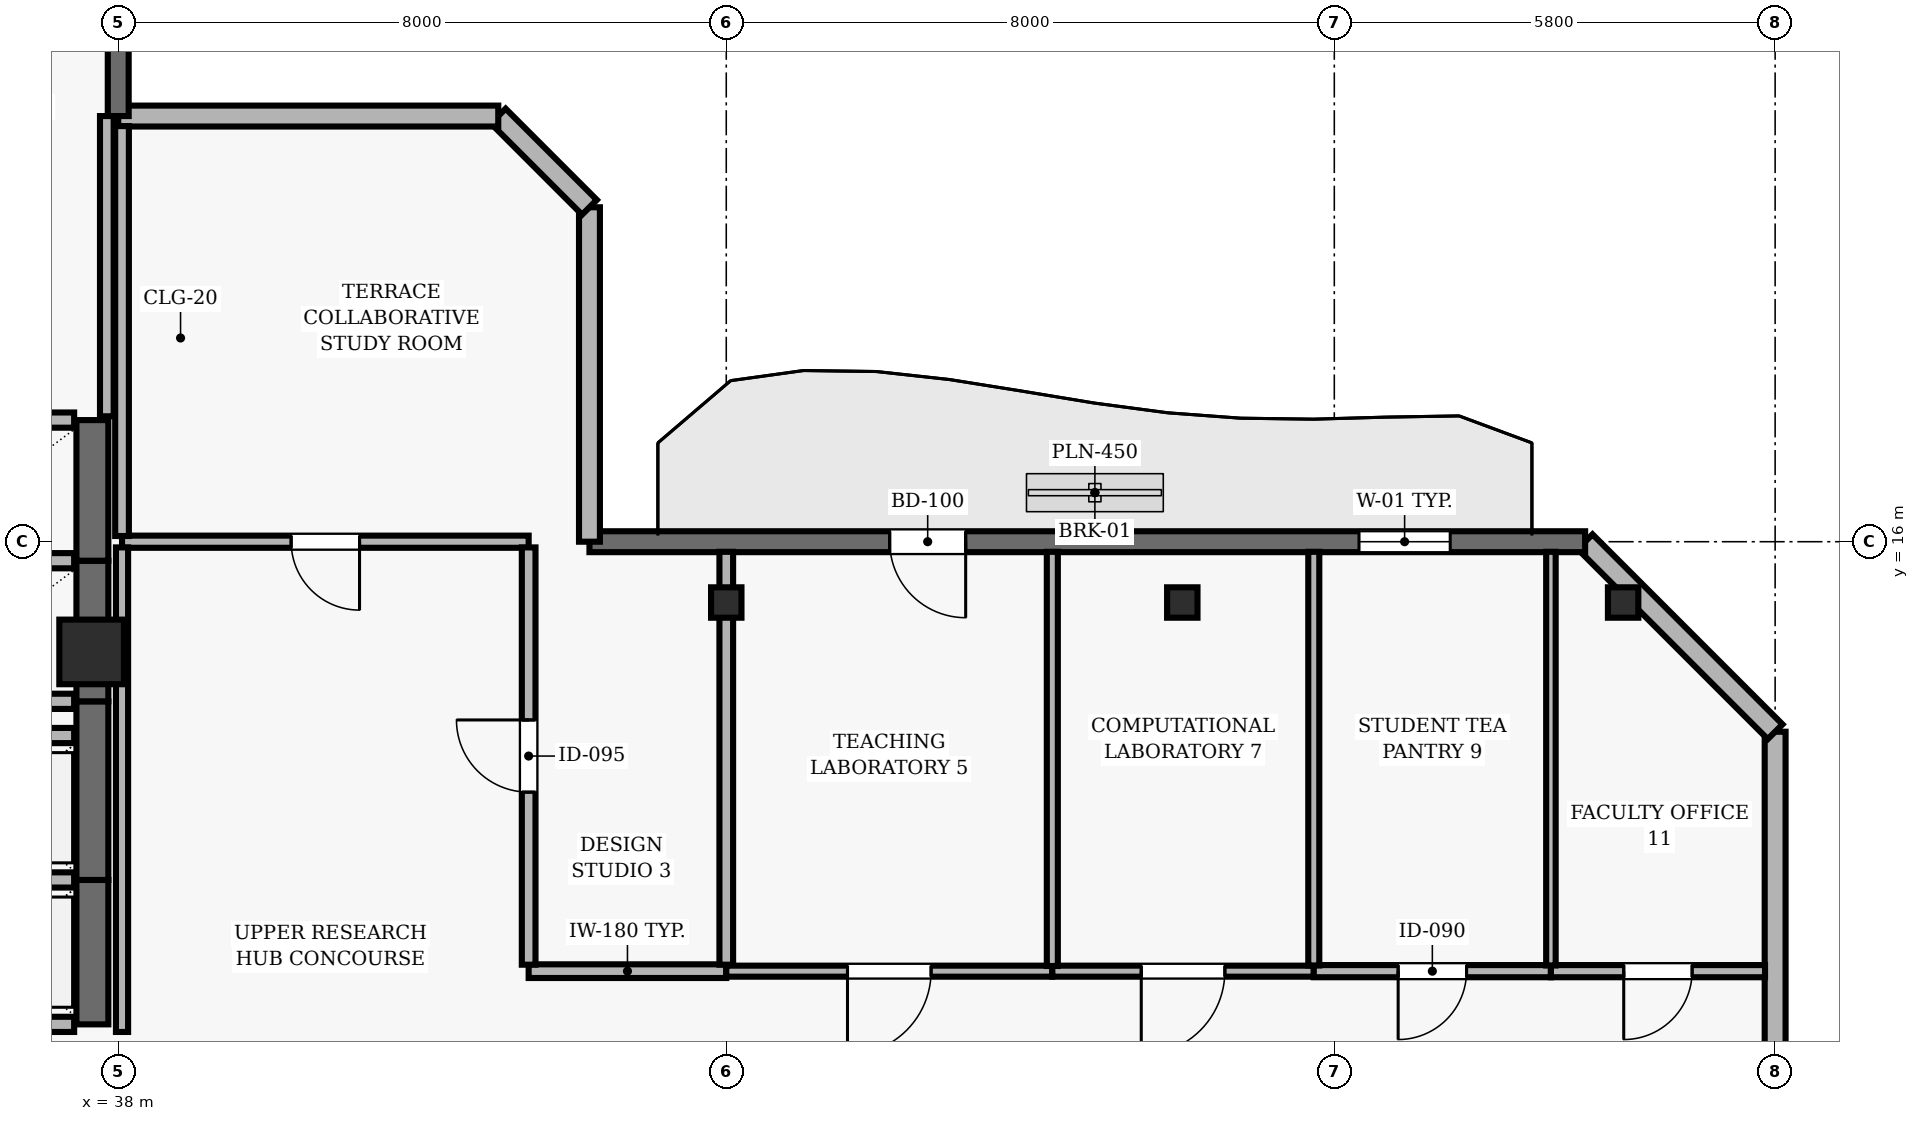
"""IFC4 building model, lengths in metres.
Left out: names, types, materials, properties, quantities, classifications, styles, units other than length and angle.
Written with IfcOpenShell. Run it as: python <this file> out.ifc"""

import sys

from ifc_helpers import new_model, si_unit, direction, frame, frame_2d, origin, origin_2d, place, context, subcontext, project, spatial, rectangle, hollow_rectangle, extrude, element, fill, save


model = new_model("IFC4")
c1 = context("Model", 3, precision=1e-05, world=origin(), true_north=direction((0.0, 1.0)))
c2 = subcontext(c1, "Body", "Model", "MODEL_VIEW")
j1 = project(units=[si_unit("LENGTHUNIT", "METRE"), si_unit("PLANEANGLEUNIT", "RADIAN")], contexts=[c1])
p1 = place(None, origin())
s1 = spatial("IfcSite", under=j1, at=p1, CompositionType="ELEMENT")
p2 = place(p1, origin())
s2 = spatial("IfcBuilding", under=s1, at=p2, CompositionType="ELEMENT")
p3 = place(p2, frame((0.0, 0.0, 279.4)))
s3 = spatial("IfcBuildingStorey", under=s2, at=p3, CompositionType="ELEMENT", Elevation=279.4)
p4 = place(p3, frame((37.65, 14.55, 0.0), z_axis=(0.0, 0.0, 1.0), x_axis=(1.0, 0.0, 0.0)))
e1 = element("IfcColumn", 1, at=p4, inside=s3, PredefinedType="COLUMN", context=c2, shape_type="SweptSolid", body=[
    extrude(rectangle(XDim=0.85, YDim=0.85, at=origin_2d()), origin(), (0.0, 0.0, 1.0), 3.9),
])
for number, where, z_axis, x_axis in (
    (2, (46.0, 15.2, 0.0), (0.0, 0.0, 1.0), (1.0, 0.0, 0.0)),
    (3, (52.0, 15.2, 0.0), (0.0, 0.0, 1.0), (1.0, 0.0, 0.0)),
    (4, (57.8, 15.2, 0.0), (0.0, 0.0, 1.0), (1.0, 0.0, 0.0)),
):
    element("IfcColumn", number, at=place(p3, frame(where, z_axis=z_axis, x_axis=x_axis)), inside=s3, PredefinedType="COLUMN", context=c2, shape_type="SweptSolid", body=[
        extrude(hollow_rectangle(XDim=0.4, YDim=0.4, WallThickness=0.02, at=origin_2d()), origin(), (0.0, 0.0, 1.0), 3.9),
    ])
p5 = place(p3, frame((59.8, 2.5, 0.0), z_axis=(0.0, 0.0, 1.0), x_axis=(0.0, 1.0, 0.0)))
e5 = element("IfcWall", 5, at=p5, inside=s3, PredefinedType="SOLIDWALL", context=c2, shape_type="SweptSolid", body=[
    extrude(rectangle(XDim=11.0, YDim=0.275, at=frame_2d((5.5, 0.0))), origin(), (0.0, 0.0, 1.0), 3.69),
])
p6 = place(p5, frame((1.55, 0.0, 0.9)))
e6 = element("IfcOpeningElement", 6, at=p6, cuts=e5, PredefinedType="OPENING", context=c2, shape_type="SweptSolid", body=[
    extrude(rectangle(XDim=2.4, YDim=2.2, at=frame_2d((1.2, 1.1))), frame((0.0, 0.147, 0.0), z_axis=(0.0, -1.0, 0.0), x_axis=(1.0, 0.0, 0.0)), (0.0, 0.0, 1.0), 0.295),
])
p7 = place(p3, frame((59.8, 13.5, 0.0), z_axis=(0.0, 0.0, 1.0), x_axis=(-0.707106781187, 0.707106781187, 0.0)))
e7 = element("IfcWall", 7, at=p7, inside=s3, PredefinedType="SOLIDWALL", context=c2, shape_type="SweptSolid", body=[
    extrude(rectangle(XDim=3.536, YDim=0.275, at=frame_2d((1.768, 0.0))), origin(), (0.0, 0.0, 1.0), 3.69),
])
p8 = place(p3, frame((57.3, 16.0, 0.0), z_axis=(0.0, 0.0, 1.0), x_axis=(-1.0, 0.0, 0.0)))
e8 = element("IfcWall", 8, at=p8, inside=s3, PredefinedType="SOLIDWALL", context=c2, shape_type="SweptSolid", body=[
    extrude(rectangle(XDim=13.1, YDim=0.275, at=frame_2d((6.55, 0.0))), origin(), (0.0, 0.0, 1.0), 3.69),
])
p9 = place(p8, frame((8.15, 0.0, 0.0)))
e9 = element("IfcOpeningElement", 9, at=p9, cuts=e8, PredefinedType="OPENING", context=c2, shape_type="SweptSolid", body=[
    extrude(rectangle(XDim=1.0, YDim=2.2, at=frame_2d((0.5, 1.1))), frame((0.0, 0.147, 0.0), z_axis=(0.0, -1.0, 0.0), x_axis=(1.0, 0.0, 0.0)), (0.0, 0.0, 1.0), 0.295),
])
p10 = place(p8, frame((1.775, 0.0, 0.9)))
e10 = element("IfcOpeningElement", 10, at=p10, cuts=e8, PredefinedType="OPENING", context=c2, shape_type="SweptSolid", body=[
    extrude(rectangle(XDim=1.2, YDim=1.6, at=frame_2d((0.6, 0.8))), frame((0.0, 0.147, 0.0), z_axis=(0.0, -1.0, 0.0), x_axis=(1.0, 0.0, 0.0)), (0.0, 0.0, 1.0), 0.295),
])
p11 = place(p3, frame((44.2, 16.0, 0.0), z_axis=(0.0, 0.0, 1.0), x_axis=(0.0, 1.0, 0.0)))
e11 = element("IfcWall", 11, at=p11, inside=s3, PredefinedType="SOLIDWALL", context=c2, shape_type="SweptSolid", body=[
    extrude(rectangle(XDim=4.4, YDim=0.275, at=frame_2d((2.2, 0.0))), origin(), (0.0, 0.0, 1.0), 3.69),
])
p12 = place(p3, frame((44.2, 20.4, 0.0), z_axis=(0.0, 0.0, 1.0), x_axis=(-0.707034851297, 0.707178703759, 0.0)))
e12 = element("IfcWall", 12, at=p12, inside=s3, PredefinedType="SOLIDWALL", context=c2, shape_type="SweptSolid", body=[
    extrude(rectangle(XDim=1.697, YDim=0.275, at=frame_2d((0.849, 0.0))), origin(), (0.0, 0.0, 1.0), 3.69),
])
p13 = place(p3, frame((43.0, 21.6, 0.0), z_axis=(0.0, 0.0, 1.0), x_axis=(-1.0, 0.0, 0.0)))
e13 = element("IfcWall", 13, at=p13, inside=s3, PredefinedType="SOLIDWALL", context=c2, shape_type="SweptSolid", body=[
    extrude(rectangle(XDim=5.0, YDim=0.275, at=frame_2d((2.5, 0.0))), origin(), (0.0, 0.0, 1.0), 3.69),
])
p14 = place(p3, frame((38.0, 21.6, 0.0), z_axis=(0.0, 0.0, 1.0), x_axis=(0.0, 1.0, 0.0)))
e14 = element("IfcWall", 14, at=p14, inside=s3, PredefinedType="SOLIDWALL", context=c2, shape_type="SweptSolid", body=[
    extrude(rectangle(XDim=13.7, YDim=0.275, at=frame_2d((6.85, 0.0))), origin(), (0.0, 0.0, 1.0), 3.69),
])
p15 = place(p14, frame((5.85, 0.0, 0.0)))
e15 = element("IfcOpeningElement", 15, at=p15, cuts=e14, PredefinedType="OPENING", context=c2, shape_type="SweptSolid", body=[
    extrude(rectangle(XDim=1.0, YDim=2.2, at=frame_2d((0.5, 1.1))), frame((0.0, 0.147, 0.0), z_axis=(0.0, -1.0, 0.0), x_axis=(1.0, 0.0, 0.0)), (0.0, 0.0, 1.0), 0.295),
])
p16 = place(p14, frame((9.075, 0.0, 0.9)))
e16 = element("IfcOpeningElement", 16, at=p16, cuts=e14, PredefinedType="OPENING", context=c2, shape_type="SweptSolid", body=[
    extrude(rectangle(XDim=2.4, YDim=1.6, at=frame_2d((1.2, 0.8))), frame((0.0, 0.147, 0.0), z_axis=(0.0, -1.0, 0.0), x_axis=(1.0, 0.0, 0.0)), (0.0, 0.0, 1.0), 0.295),
])
p17 = place(p3, frame((37.66, 9.65, 0.0), z_axis=(0.0, 0.0, 1.0), x_axis=(0.0, 1.0, 0.0)))
e17 = element("IfcWall", 17, at=p17, inside=s3, PredefinedType="SHEAR", context=c2, shape_type="SweptSolid", body=[
    extrude(rectangle(XDim=1.9, YDim=0.42, at=frame_2d((0.95, 0.0))), origin(), (0.0, 0.0, 1.0), 3.69),
])
for number, where, z_axis, x_axis in (
    (18, (35.28, 9.65, 0.0), (0.0, 0.0, 1.0), (1.0, 0.0, 0.0)),
    (19, (37.42, 11.55, 0.0), (0.0, 0.0, 1.0), (-1.0, 0.0, 0.0)),
):
    element("IfcWall", number, at=place(p3, frame(where, z_axis=z_axis, x_axis=x_axis)), inside=s3, PredefinedType="SOLIDWALL", context=c2, shape_type="SweptSolid", body=[
        extrude(rectangle(XDim=2.14, YDim=0.2, at=frame_2d((1.07, 0.0))), origin(), (0.0, 0.0, 1.0), 3.69),
    ])
p18 = place(p3, frame((37.66, 11.55, 0.0), z_axis=(0.0, 0.0, 1.0), x_axis=(0.0, 1.0, 0.0)))
e20 = element("IfcWall", 20, at=p18, inside=s3, PredefinedType="SHEAR", context=c2, shape_type="SweptSolid", body=[
    extrude(rectangle(XDim=2.35, YDim=0.42, at=frame_2d((1.175, 0.0))), origin(), (0.0, 0.0, 1.0), 3.69),
])
p19 = place(p3, frame((37.42, 13.45, 0.0), z_axis=(0.0, 0.0, 1.0), x_axis=(-1.0, 0.0, 0.0)))
e21 = element("IfcWall", 21, at=p19, inside=s3, PredefinedType="SOLIDWALL", context=c2, shape_type="SweptSolid", body=[
    extrude(rectangle(XDim=2.14, YDim=0.2, at=frame_2d((1.07, 0.0))), origin(), (0.0, 0.0, 1.0), 3.69),
])
p20 = place(p3, frame((37.66, 13.9, 0.0), z_axis=(0.0, 0.0, 1.0), x_axis=(0.0, 1.0, 0.0)))
e22 = element("IfcWall", 22, at=p20, inside=s3, PredefinedType="SHEAR", context=c2, shape_type="SweptSolid", body=[
    extrude(rectangle(XDim=1.85, YDim=0.42, at=frame_2d((0.925, 0.0))), origin(), (0.0, 0.0, 1.0), 3.69),
])
for number, where, z_axis, x_axis in (
    (23, (35.28, 13.9, 0.0), (0.0, 0.0, 1.0), (1.0, 0.0, 0.0)),
    (24, (37.42, 15.75, 0.0), (0.0, 0.0, 1.0), (-1.0, 0.0, 0.0)),
):
    element("IfcWall", number, at=place(p3, frame(where, z_axis=z_axis, x_axis=x_axis)), inside=s3, PredefinedType="SOLIDWALL", context=c2, shape_type="SweptSolid", body=[
        extrude(rectangle(XDim=2.14, YDim=0.2, at=frame_2d((1.07, 0.0))), origin(), (0.0, 0.0, 1.0), 3.69),
    ])
p21 = place(p3, frame((37.66, 15.75, 0.0), z_axis=(0.0, 0.0, 1.0), x_axis=(0.0, 1.0, 0.0)))
e25 = element("IfcWall", 25, at=p21, inside=s3, PredefinedType="SHEAR", context=c2, shape_type="SweptSolid", body=[
    extrude(rectangle(XDim=1.85, YDim=0.42, at=frame_2d((0.925, 0.0))), origin(), (0.0, 0.0, 1.0), 3.69),
])
p22 = place(p3, frame((37.42, 17.6, 0.0), z_axis=(0.0, 0.0, 1.0), x_axis=(-1.0, 0.0, 0.0)))
e26 = element("IfcWall", 26, at=p22, inside=s3, PredefinedType="SOLIDWALL", context=c2, shape_type="SweptSolid", body=[
    extrude(rectangle(XDim=2.14, YDim=0.2, at=frame_2d((1.07, 0.0))), origin(), (0.0, 0.0, 1.0), 3.69),
])
p23 = place(p3, frame((43.4, 16.0, 0.0), z_axis=(0.0, 0.0, 1.0), x_axis=(-1.0, 0.0, 0.0)))
e27 = element("IfcWall", 27, at=p23, inside=s3, PredefinedType="PARTITIONING", context=c2, shape_type="SweptSolid", body=[
    extrude(rectangle(XDim=5.35, YDim=0.16, at=frame_2d((2.675, 0.0))), origin(), (0.0, 0.0, 1.0), 3.39),
])
p24 = place(p23, frame((2.225, 0.0, 0.0)))
e28 = element("IfcOpeningElement", 28, at=p24, cuts=e27, PredefinedType="OPENING", context=c2, shape_type="SweptSolid", body=[
    extrude(rectangle(XDim=0.9, YDim=2.1, at=frame_2d((0.45, 1.05))), frame((0.0, 0.09, 0.0), z_axis=(0.0, -1.0, 0.0), x_axis=(1.0, 0.0, 0.0)), (0.0, 0.0, 1.0), 0.18),
])
p25 = place(p3, frame((46.0, 10.35, 0.0), z_axis=(0.0, 0.0, 1.0), x_axis=(-1.0, 0.0, 0.0)))
e29 = element("IfcWall", 29, at=p25, inside=s3, PredefinedType="PARTITIONING", context=c2, shape_type="SweptSolid", body=[
    extrude(rectangle(XDim=2.6, YDim=0.18, at=frame_2d((1.3, 0.0))), origin(), (0.0, 0.0, 1.0), 3.372),
])
p26 = place(p3, frame((50.29, 10.35, 0.0), z_axis=(0.0, 0.0, 1.0), x_axis=(-1.0, 0.0, 0.0)))
e30 = element("IfcWall", 30, at=p26, inside=s3, PredefinedType="PARTITIONING", context=c2, shape_type="SweptSolid", body=[
    extrude(rectangle(XDim=4.29, YDim=0.145, at=frame_2d((2.145, 0.0))), origin(), (0.0, 0.0, 1.0), 3.372),
])
p27 = place(p26, frame((1.595, 0.0, 0.0)))
e31 = element("IfcOpeningElement", 31, at=p27, cuts=e30, PredefinedType="OPENING", context=c2, shape_type="SweptSolid", body=[
    extrude(rectangle(XDim=1.1, YDim=2.15, at=frame_2d((0.55, 1.075))), frame((0.0, 0.083, 0.0), z_axis=(0.0, -1.0, 0.0), x_axis=(1.0, 0.0, 0.0)), (0.0, 0.0, 1.0), 0.165),
])
p28 = place(p3, frame((53.73, 10.35, 0.0), z_axis=(0.0, 0.0, 1.0), x_axis=(-1.0, 0.0, 0.0)))
e32 = element("IfcWall", 32, at=p28, inside=s3, PredefinedType="PARTITIONING", context=c2, shape_type="SweptSolid", body=[
    extrude(rectangle(XDim=3.44, YDim=0.145, at=frame_2d((1.72, 0.0))), origin(), (0.0, 0.0, 1.0), 3.372),
])
p29 = place(p28, frame((1.17, 0.0, 0.0)))
e33 = element("IfcOpeningElement", 33, at=p29, cuts=e32, PredefinedType="OPENING", context=c2, shape_type="SweptSolid", body=[
    extrude(rectangle(XDim=1.1, YDim=2.15, at=frame_2d((0.55, 1.075))), frame((0.0, 0.083, 0.0), z_axis=(0.0, -1.0, 0.0), x_axis=(1.0, 0.0, 0.0)), (0.0, 0.0, 1.0), 0.165),
])
p30 = place(p3, frame((56.85, 10.35, 0.0), z_axis=(0.0, 0.0, 1.0), x_axis=(-1.0, 0.0, 0.0)))
e34 = element("IfcWall", 34, at=p30, inside=s3, PredefinedType="PARTITIONING", context=c2, shape_type="SweptSolid", body=[
    extrude(rectangle(XDim=3.12, YDim=0.16, at=frame_2d((1.56, 0.0))), origin(), (0.0, 0.0, 1.0), 3.372),
])
p31 = place(p30, frame((1.11, 0.0, 0.0)))
e35 = element("IfcOpeningElement", 35, at=p31, cuts=e34, PredefinedType="OPENING", context=c2, shape_type="SweptSolid", body=[
    extrude(rectangle(XDim=0.9, YDim=2.1, at=frame_2d((0.45, 1.05))), frame((0.0, 0.09, 0.0), z_axis=(0.0, -1.0, 0.0), x_axis=(1.0, 0.0, 0.0)), (0.0, 0.0, 1.0), 0.18),
])
p32 = place(p3, frame((59.667, 10.35, 0.0), z_axis=(0.0, 0.0, 1.0), x_axis=(-1.0, 0.0, 0.0)))
e36 = element("IfcWall", 36, at=p32, inside=s3, PredefinedType="PARTITIONING", context=c2, shape_type="SweptSolid", body=[
    extrude(rectangle(XDim=2.817, YDim=0.16, at=frame_2d((1.408, 0.0))), origin(), (0.0, 0.0, 1.0), 3.372),
])
p33 = place(p32, frame((0.959, 0.0, 0.0)))
e37 = element("IfcOpeningElement", 37, at=p33, cuts=e36, PredefinedType="OPENING", context=c2, shape_type="SweptSolid", body=[
    extrude(rectangle(XDim=0.9, YDim=2.1, at=frame_2d((0.45, 1.05))), frame((0.0, 0.09, 0.0), z_axis=(0.0, -1.0, 0.0), x_axis=(1.0, 0.0, 0.0)), (0.0, 0.0, 1.0), 0.18),
])
p34 = place(p3, frame((37.85, 17.65, 0.0), z_axis=(0.0, 0.0, 1.0), x_axis=(0.0, 1.0, 0.0)))
e38 = element("IfcWall", 38, at=p34, inside=s3, PredefinedType="PARTITIONING", context=c2, shape_type="SweptSolid", body=[
    extrude(rectangle(XDim=3.95, YDim=0.18, at=frame_2d((1.975, 0.0))), origin(), (0.0, 0.0, 1.0), 3.221),
])
p35 = place(p3, frame((38.05, 15.925, 0.0), z_axis=(0.0, 0.0, 1.0), x_axis=(0.0, -1.0, 0.0)))
e39 = element("IfcWall", 39, at=p35, inside=s3, PredefinedType="PARTITIONING", context=c2, shape_type="SweptSolid", body=[
    extrude(rectangle(XDim=6.375, YDim=0.16, at=frame_2d((3.188, 0.0))), origin(), (0.0, 0.0, 1.0), 3.221),
])
p36 = place(p3, frame((38.05, 21.468, 0.0), z_axis=(0.0, 0.0, 1.0), x_axis=(0.0, -1.0, 0.0)))
e40 = element("IfcWall", 40, at=p36, inside=s3, PredefinedType="PARTITIONING", context=c2, shape_type="SweptSolid", body=[
    extrude(rectangle(XDim=5.393, YDim=0.18, at=frame_2d((2.697, 0.0))), origin(), (0.0, 0.0, 1.0), 3.221),
])
p37 = place(p3, frame((43.4, 10.435, 0.0), z_axis=(0.0, 0.0, 1.0), x_axis=(0.0, 1.0, 0.0)))
e41 = element("IfcWall", 41, at=p37, inside=s3, PredefinedType="PARTITIONING", context=c2, shape_type="SweptSolid", body=[
    extrude(rectangle(XDim=5.49, YDim=0.18, at=frame_2d((2.745, 0.0))), origin(), (0.0, 0.0, 1.0), 3.69),
])
p38 = place(p37, frame((2.27, 0.0, 0.0)))
e42 = element("IfcOpeningElement", 42, at=p38, cuts=e41, PredefinedType="OPENING", context=c2, shape_type="SweptSolid", body=[
    extrude(rectangle(XDim=0.95, YDim=2.1, at=frame_2d((0.475, 1.05))), frame((0.0, 0.1, 0.0), z_axis=(0.0, -1.0, 0.0), x_axis=(1.0, 0.0, 0.0)), (0.0, 0.0, 1.0), 0.2),
])
p39 = place(p3, frame((46.0, 10.435, 0.0), z_axis=(0.0, 0.0, 1.0), x_axis=(0.0, 1.0, 0.0)))
e43 = element("IfcWall", 43, at=p39, inside=s3, PredefinedType="PARTITIONING", context=c2, shape_type="SweptSolid", body=[
    extrude(rectangle(XDim=5.432, YDim=0.18, at=frame_2d((2.716, 0.0))), origin(), (0.0, 0.0, 1.0), 3.221),
])
p40 = place(p3, frame((50.29, 10.418, 0.0), z_axis=(0.0, 0.0, 1.0), x_axis=(0.0, 1.0, 0.0)))
e44 = element("IfcWall", 44, at=p40, inside=s3, PredefinedType="PARTITIONING", context=c2, shape_type="SweptSolid", body=[
    extrude(rectangle(XDim=5.449, YDim=0.145, at=frame_2d((2.725, 0.0))), origin(), (0.0, 0.0, 1.0), 3.69),
])
p41 = place(p3, frame((53.73, 10.425, 0.0), z_axis=(0.0, 0.0, 1.0), x_axis=(0.0, 1.0, 0.0)))
e45 = element("IfcWall", 45, at=p41, inside=s3, PredefinedType="PARTITIONING", context=c2, shape_type="SweptSolid", body=[
    extrude(rectangle(XDim=5.442, YDim=0.145, at=frame_2d((2.721, 0.0))), origin(), (0.0, 0.0, 1.0), 3.69),
])
p42 = place(p3, frame((56.85, 10.425, 0.0), z_axis=(0.0, 0.0, 1.0), x_axis=(0.0, 1.0, 0.0)))
e46 = element("IfcWall", 46, at=p42, inside=s3, PredefinedType="PARTITIONING", context=c2, shape_type="SweptSolid", body=[
    extrude(rectangle(XDim=5.442, YDim=0.125, at=frame_2d((2.721, 0.0))), origin(), (0.0, 0.0, 1.0), 3.69),
])
p43 = place(p9, origin())
e47 = element("IfcDoor", 47, at=p43, inside=s3, OperationType="SINGLE_SWING_LEFT", PredefinedType="DOOR", context=c2, shape_type="SweptSolid", body=[
    extrude(rectangle(XDim=1.0, YDim=2.2, at=frame_2d((0.5, 1.1))), frame((0.0, 0.025, 0.0), z_axis=(0.0, -1.0, 0.0), x_axis=(1.0, 0.0, 0.0)), (0.0, 0.0, 1.0), 0.05),
])
fill(e9, e47)
p44 = place(p10, origin())
e48 = element("IfcWindow", 48, at=p44, inside=s3, PartitioningType="SINGLE_PANEL", PredefinedType="WINDOW", context=c2, shape_type="SweptSolid", body=[
    extrude(rectangle(XDim=1.2, YDim=1.6, at=frame_2d((0.6, 0.8))), frame((0.0, 0.03, 0.0), z_axis=(0.0, -1.0, 0.0), x_axis=(1.0, 0.0, 0.0)), (0.0, 0.0, 1.0), 0.06),
])
fill(e10, e48)
p45 = place(p38, origin())
e49 = element("IfcDoor", 49, at=p45, inside=s3, OperationType="SINGLE_SWING_RIGHT", PredefinedType="DOOR", context=c2, shape_type="SweptSolid", body=[
    extrude(rectangle(XDim=0.95, YDim=2.1, at=frame_2d((0.475, 1.05))), frame((0.0, 0.025, 0.0), z_axis=(0.0, -1.0, 0.0), x_axis=(1.0, 0.0, 0.0)), (0.0, 0.0, 1.0), 0.05),
])
fill(e42, e49)
p46 = place(p27, origin())
e50 = element("IfcDoor", 50, at=p46, inside=s3, OperationType="SINGLE_SWING_RIGHT", PredefinedType="DOOR", context=c2, shape_type="SweptSolid", body=[
    extrude(rectangle(XDim=1.1, YDim=2.15, at=frame_2d((0.55, 1.075))), frame((0.0, 0.025, 0.0), z_axis=(0.0, -1.0, 0.0), x_axis=(1.0, 0.0, 0.0)), (0.0, 0.0, 1.0), 0.05),
])
fill(e31, e50)
p47 = place(p29, origin())
e51 = element("IfcDoor", 51, at=p47, inside=s3, OperationType="SINGLE_SWING_RIGHT", PredefinedType="DOOR", context=c2, shape_type="SweptSolid", body=[
    extrude(rectangle(XDim=1.1, YDim=2.15, at=frame_2d((0.55, 1.075))), frame((0.0, 0.025, 0.0), z_axis=(0.0, -1.0, 0.0), x_axis=(1.0, 0.0, 0.0)), (0.0, 0.0, 1.0), 0.05),
])
fill(e33, e51)
p48 = place(p31, origin())
e52 = element("IfcDoor", 52, at=p48, inside=s3, OperationType="SINGLE_SWING_RIGHT", PredefinedType="DOOR", context=c2, shape_type="SweptSolid", body=[
    extrude(rectangle(XDim=0.9, YDim=2.1, at=frame_2d((0.45, 1.05))), frame((0.0, 0.025, 0.0), z_axis=(0.0, -1.0, 0.0), x_axis=(1.0, 0.0, 0.0)), (0.0, 0.0, 1.0), 0.05),
])
fill(e35, e52)
p49 = place(p33, origin())
e53 = element("IfcDoor", 53, at=p49, inside=s3, OperationType="SINGLE_SWING_RIGHT", PredefinedType="DOOR", context=c2, shape_type="SweptSolid", body=[
    extrude(rectangle(XDim=0.9, YDim=2.1, at=frame_2d((0.45, 1.05))), frame((0.0, 0.025, 0.0), z_axis=(0.0, -1.0, 0.0), x_axis=(1.0, 0.0, 0.0)), (0.0, 0.0, 1.0), 0.05),
])
fill(e37, e53)
p50 = place(p24, origin())
e54 = element("IfcDoor", 54, at=p50, inside=s3, OperationType="SINGLE_SWING_LEFT", PredefinedType="DOOR", context=c2, shape_type="SweptSolid", body=[
    extrude(rectangle(XDim=0.9, YDim=2.1, at=frame_2d((0.45, 1.05))), frame((0.0, 0.025, 0.0), z_axis=(0.0, -1.0, 0.0), x_axis=(1.0, 0.0, 0.0)), (0.0, 0.0, 1.0), 0.05),
])
fill(e28, e54)
save(model, sys.argv[1])
